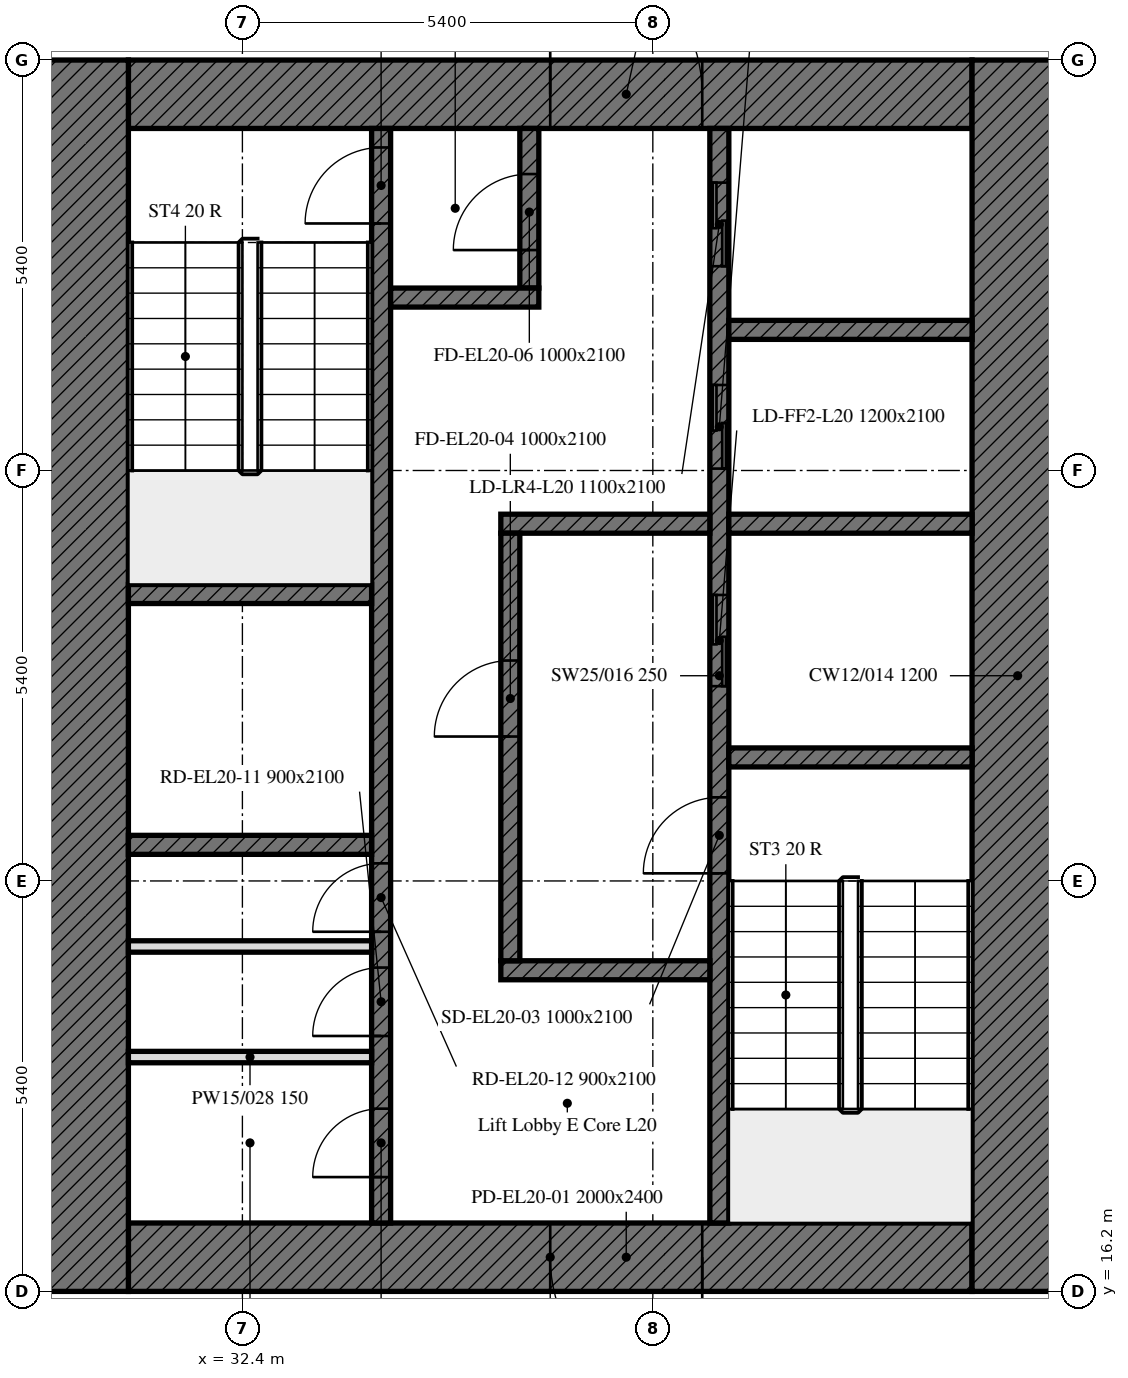
"""IFC4 building model, lengths in metres.
Left out: names, types, materials, properties, quantities, classifications, styles, units other than length and angle.
Written with IfcOpenShell. Run it as: python <this file> out.ifc"""

import sys

from ifc_helpers import new_model, si_unit, direction, frame, frame_2d, origin, place, context, subcontext, project, spatial, rectangle, extrude, element, fill, save


model = new_model("IFC4")
c1 = context("Model", 3, precision=1e-05, world=origin(), true_north=direction((0.0, 1.0)))
c2 = subcontext(c1, "Body", "Model", "MODEL_VIEW")
j1 = project(units=[si_unit("LENGTHUNIT", "METRE"), si_unit("PLANEANGLEUNIT", "RADIAN")], contexts=[c1])
p1 = place(None, origin())
s1 = spatial("IfcSite", under=j1, at=p1, CompositionType="ELEMENT")
p2 = place(p1, origin())
s2 = spatial("IfcBuilding", under=s1, at=p2, CompositionType="ELEMENT")
p3 = place(p2, frame((0.0, 0.0, 87.8)))
s3 = spatial("IfcBuildingStorey", under=s2, at=p3, CompositionType="ELEMENT", Elevation=87.8)
p4 = place(p3, frame((42.0, 16.65, 0.0), z_axis=(0.0, 0.0, 1.0), x_axis=(-1.0, 0.0, 0.0)))
e1 = element("IfcWall", 1, at=p4, inside=s3, PredefinedType="SOLIDWALL", context=c2, shape_type="SweptSolid", body=[
    extrude(rectangle(XDim=11.1, YDim=0.9, at=frame_2d((5.55, 0.0))), origin(), (0.0, 0.0, 1.0), 3.5),
])
p5 = place(p4, frame((3.55, 0.0, 0.0)))
e2 = element("IfcOpeningElement", 2, at=p5, cuts=e1, PredefinedType="OPENING", context=c2, shape_type="SweptSolid", body=[
    extrude(rectangle(XDim=2.0, YDim=2.4, at=frame_2d((1.0, 1.2))), frame((0.0, 0.45, 0.0), z_axis=(0.0, -1.0, 0.0), x_axis=(1.0, 0.0, 0.0)), (0.0, 0.0, 1.0), 0.9),
])
p6 = place(p3, frame((30.9, 31.95, 0.0), z_axis=(0.0, 0.0, 1.0), x_axis=(1.0, 0.0, 0.0)))
e3 = element("IfcWall", 3, at=p6, inside=s3, PredefinedType="SOLIDWALL", context=c2, shape_type="SweptSolid", body=[
    extrude(rectangle(XDim=11.1, YDim=0.9, at=frame_2d((5.55, 0.0))), origin(), (0.0, 0.0, 1.0), 3.5),
])
p7 = place(p6, frame((5.55, 0.0, 0.0)))
e4 = element("IfcOpeningElement", 4, at=p7, cuts=e3, PredefinedType="OPENING", context=c2, shape_type="SweptSolid", body=[
    extrude(rectangle(XDim=2.0, YDim=2.4, at=frame_2d((1.0, 1.2))), frame((0.0, 0.45, 0.0), z_axis=(0.0, -1.0, 0.0), x_axis=(1.0, 0.0, 0.0)), (0.0, 0.0, 1.0), 0.9),
])
for number, where, z_axis, x_axis in (
    (5, (42.6, 32.4, 0.0), (0.0, 0.0, 1.0), (0.0, -1.0, 0.0)),
    (6, (30.3, 16.2, 0.0), (0.0, 0.0, 1.0), (0.0, 1.0, 0.0)),
):
    element("IfcWall", number, at=place(p3, frame(where, z_axis=z_axis, x_axis=x_axis)), inside=s3, PredefinedType="SOLIDWALL", context=c2, shape_type="SweptSolid", body=[
        extrude(rectangle(XDim=16.2, YDim=1.2, at=frame_2d((8.1, 0.0))), origin(), (0.0, 0.0, 1.0), 3.5),
    ])
p8 = place(p3, frame((38.675, 17.1, 0.0), z_axis=(0.0, 0.0, 1.0), x_axis=(0.0, 1.0, 0.0)))
e7 = element("IfcWall", 7, at=p8, inside=s3, PredefinedType="SOLIDWALL", context=c2, shape_type="SweptSolid", body=[
    extrude(rectangle(XDim=14.4, YDim=0.25, at=frame_2d((7.2, 0.0))), origin(), (0.0, 0.0, 1.0), 3.5),
])
p9 = place(p8, frame((4.6, 0.0, 0.0)))
e8 = element("IfcOpeningElement", 8, at=p9, cuts=e7, PredefinedType="OPENING", context=c2, shape_type="SweptSolid", body=[
    extrude(rectangle(XDim=1.0, YDim=2.1, at=frame_2d((0.5, 1.05))), frame((0.0, 0.125, 0.0), z_axis=(0.0, -1.0, 0.0), x_axis=(1.0, 0.0, 0.0)), (0.0, 0.0, 1.0), 0.25),
])
p10 = place(p8, frame((7.062, 0.0, 0.0)))
e9 = element("IfcOpeningElement", 9, at=p10, cuts=e7, PredefinedType="OPENING", context=c2, shape_type="SweptSolid", body=[
    extrude(rectangle(XDim=1.2, YDim=2.1, at=frame_2d((0.6, 1.05))), frame((0.0, 0.125, 0.0), z_axis=(0.0, -1.0, 0.0), x_axis=(1.0, 0.0, 0.0)), (0.0, 0.0, 1.0), 0.25),
])
p11 = place(p8, frame((9.925, 0.0, 0.0)))
e10 = element("IfcOpeningElement", 10, at=p11, cuts=e7, PredefinedType="OPENING", context=c2, shape_type="SweptSolid", body=[
    extrude(rectangle(XDim=1.1, YDim=2.1, at=frame_2d((0.55, 1.05))), frame((0.0, 0.125, 0.0), z_axis=(0.0, -1.0, 0.0), x_axis=(1.0, 0.0, 0.0)), (0.0, 0.0, 1.0), 0.25),
])
p12 = place(p8, frame((12.587, 0.0, 0.0)))
e11 = element("IfcOpeningElement", 11, at=p12, cuts=e7, PredefinedType="OPENING", context=c2, shape_type="SweptSolid", body=[
    extrude(rectangle(XDim=1.1, YDim=2.1, at=frame_2d((0.55, 1.05))), frame((0.0, 0.125, 0.0), z_axis=(0.0, -1.0, 0.0), x_axis=(1.0, 0.0, 0.0)), (0.0, 0.0, 1.0), 0.25),
])
p13 = place(p3, frame((34.225, 17.1, 0.0), z_axis=(0.0, 0.0, 1.0), x_axis=(0.0, 1.0, 0.0)))
e12 = element("IfcWall", 12, at=p13, inside=s3, PredefinedType="SOLIDWALL", context=c2, shape_type="SweptSolid", body=[
    extrude(rectangle(XDim=14.4, YDim=0.25, at=frame_2d((7.2, 0.0))), origin(), (0.0, 0.0, 1.0), 3.5),
])
p14 = place(p13, frame((13.15, 0.0, 0.0)))
e13 = element("IfcOpeningElement", 13, at=p14, cuts=e12, PredefinedType="OPENING", context=c2, shape_type="SweptSolid", body=[
    extrude(rectangle(XDim=1.0, YDim=2.1, at=frame_2d((0.5, 1.05))), frame((0.0, 0.125, 0.0), z_axis=(0.0, -1.0, 0.0), x_axis=(1.0, 0.0, 0.0)), (0.0, 0.0, 1.0), 0.25),
])
p15 = place(p13, frame((0.604, 0.0, 0.0)))
e14 = element("IfcOpeningElement", 14, at=p15, cuts=e12, PredefinedType="OPENING", context=c2, shape_type="SweptSolid", body=[
    extrude(rectangle(XDim=0.9, YDim=2.1, at=frame_2d((0.45, 1.05))), frame((0.0, 0.125, 0.0), z_axis=(0.0, -1.0, 0.0), x_axis=(1.0, 0.0, 0.0)), (0.0, 0.0, 1.0), 0.25),
])
p16 = place(p13, frame((2.46, 0.0, 0.0)))
e15 = element("IfcOpeningElement", 15, at=p16, cuts=e12, PredefinedType="OPENING", context=c2, shape_type="SweptSolid", body=[
    extrude(rectangle(XDim=0.9, YDim=2.1, at=frame_2d((0.45, 1.05))), frame((0.0, 0.125, 0.0), z_axis=(0.0, -1.0, 0.0), x_axis=(1.0, 0.0, 0.0)), (0.0, 0.0, 1.0), 0.25),
])
p17 = place(p13, frame((3.832, 0.0, 0.0)))
e16 = element("IfcOpeningElement", 16, at=p17, cuts=e12, PredefinedType="OPENING", context=c2, shape_type="SweptSolid", body=[
    extrude(rectangle(XDim=0.9, YDim=2.1, at=frame_2d((0.45, 1.05))), frame((0.0, 0.125, 0.0), z_axis=(0.0, -1.0, 0.0), x_axis=(1.0, 0.0, 0.0)), (0.0, 0.0, 1.0), 0.25),
])
p18 = place(p3, frame((38.8, 23.225, 0.0), z_axis=(0.0, 0.0, 1.0), x_axis=(1.0, 0.0, 0.0)))
e17 = element("IfcWall", 17, at=p18, inside=s3, PredefinedType="SOLIDWALL", context=c2, shape_type="SweptSolid", body=[
    extrude(rectangle(XDim=3.2, YDim=0.25, at=frame_2d((1.6, 0.0))), origin(), (0.0, 0.0, 1.0), 3.5),
])
for number, where, z_axis, x_axis in (
    (18, (30.9, 25.375, 0.0), (0.0, 0.0, 1.0), (1.0, 0.0, 0.0)),
    (19, (30.9, 22.075, 0.0), (0.0, 0.0, 1.0), (1.0, 0.0, 0.0)),
):
    element("IfcWall", number, at=place(p3, frame(where, z_axis=z_axis, x_axis=x_axis)), inside=s3, PredefinedType="SOLIDWALL", context=c2, shape_type="SweptSolid", body=[
        extrude(rectangle(XDim=3.2, YDim=0.25, at=frame_2d((1.6, 0.0))), origin(), (0.0, 0.0, 1.0), 3.5),
    ])
p19 = place(p3, frame((38.8, 26.3, 0.0), z_axis=(0.0, 0.0, 1.0), x_axis=(1.0, 0.0, 0.0)))
e20 = element("IfcWall", 20, at=p19, inside=s3, PredefinedType="SOLIDWALL", context=c2, shape_type="SweptSolid", body=[
    extrude(rectangle(XDim=3.2, YDim=0.25, at=frame_2d((1.6, 0.0))), origin(), (0.0, 0.0, 1.0), 3.5),
])
for number, where, z_axis, x_axis in (
    (21, (35.8, 26.3, 0.0), (0.0, 0.0, 1.0), (1.0, 0.0, 0.0)),
    (22, (35.8, 20.425, 0.0), (0.0, 0.0, 1.0), (1.0, 0.0, 0.0)),
):
    element("IfcWall", number, at=place(p3, frame(where, z_axis=z_axis, x_axis=x_axis)), inside=s3, PredefinedType="SOLIDWALL", context=c2, shape_type="SweptSolid", body=[
        extrude(rectangle(XDim=2.75, YDim=0.25, at=frame_2d((1.375, 0.0))), origin(), (0.0, 0.0, 1.0), 3.5),
    ])
p20 = place(p3, frame((36.175, 29.4, 0.0), z_axis=(0.0, 0.0, 1.0), x_axis=(0.0, 1.0, 0.0)))
e23 = element("IfcWall", 23, at=p20, inside=s3, PredefinedType="SOLIDWALL", context=c2, shape_type="SweptSolid", body=[
    extrude(rectangle(XDim=2.1, YDim=0.25, at=frame_2d((1.05, 0.0))), origin(), (0.0, 0.0, 1.0), 3.5),
])
p21 = place(p20, frame((0.5, 0.0, 0.0)))
e24 = element("IfcOpeningElement", 24, at=p21, cuts=e23, PredefinedType="OPENING", context=c2, shape_type="SweptSolid", body=[
    extrude(rectangle(XDim=1.0, YDim=2.1, at=frame_2d((0.5, 1.05))), frame((0.0, 0.125, 0.0), z_axis=(0.0, -1.0, 0.0), x_axis=(1.0, 0.0, 0.0)), (0.0, 0.0, 1.0), 0.25),
])
p22 = place(p3, frame((34.35, 29.275, 0.0), z_axis=(0.0, 0.0, 1.0), x_axis=(1.0, 0.0, 0.0)))
e25 = element("IfcWall", 25, at=p22, inside=s3, PredefinedType="SOLIDWALL", context=c2, shape_type="SweptSolid", body=[
    extrude(rectangle(XDim=1.95, YDim=0.25, at=frame_2d((0.975, 0.0))), origin(), (0.0, 0.0, 1.0), 3.5),
])
p23 = place(p3, frame((35.925, 20.55, 0.0), z_axis=(0.0, 0.0, 1.0), x_axis=(0.0, 1.0, 0.0)))
e26 = element("IfcWall", 26, at=p23, inside=s3, PredefinedType="SOLIDWALL", context=c2, shape_type="SweptSolid", body=[
    extrude(rectangle(XDim=5.625, YDim=0.25, at=frame_2d((2.812, 0.0))), origin(), (0.0, 0.0, 1.0), 3.5),
])
p24 = place(p23, frame((2.95, 0.0, 0.0)))
e27 = element("IfcOpeningElement", 27, at=p24, cuts=e26, PredefinedType="OPENING", context=c2, shape_type="SweptSolid", body=[
    extrude(rectangle(XDim=1.0, YDim=2.1, at=frame_2d((0.5, 1.05))), frame((0.0, 0.125, 0.0), z_axis=(0.0, -1.0, 0.0), x_axis=(1.0, 0.0, 0.0)), (0.0, 0.0, 1.0), 0.25),
])
p25 = place(p3, frame((38.8, 28.85, 0.0), z_axis=(0.0, 0.0, 1.0), x_axis=(1.0, 0.0, 0.0)))
e28 = element("IfcWall", 28, at=p25, inside=s3, PredefinedType="SOLIDWALL", context=c2, shape_type="SweptSolid", body=[
    extrude(rectangle(XDim=3.2, YDim=0.25, at=frame_2d((1.6, 0.0))), origin(), (0.0, 0.0, 1.0), 3.5),
])
for number, where, z_axis, x_axis in (
    (29, (30.9, 19.283, 0.0), (0.0, 0.0, 1.0), (1.0, 0.0, 0.0)),
    (30, (30.9, 20.738, 0.0), (0.0, 0.0, 1.0), (1.0, 0.0, 0.0)),
):
    element("IfcWall", number, at=place(p3, frame(where, z_axis=z_axis, x_axis=x_axis)), inside=s3, PredefinedType="PARTITIONING", context=c2, shape_type="SweptSolid", body=[
        extrude(rectangle(XDim=3.2, YDim=0.15, at=frame_2d((1.6, 0.0))), origin(), (0.0, 0.0, 1.0), 3.5),
    ])
p26 = place(p5, origin())
e31 = element("IfcDoor", 31, at=p26, inside=s3, OperationType="DOUBLE_DOOR_SINGLE_SWING", PredefinedType="DOOR", context=c2, shape_type="SweptSolid", body=[
    extrude(rectangle(XDim=2.0, YDim=2.4, at=frame_2d((1.0, 1.2))), frame((0.0, 0.025, 0.0), z_axis=(0.0, -1.0, 0.0), x_axis=(1.0, 0.0, 0.0)), (0.0, 0.0, 1.0), 0.05),
])
fill(e2, e31)
p27 = place(p7, origin())
e32 = element("IfcDoor", 32, at=p27, inside=s3, OperationType="DOUBLE_DOOR_SINGLE_SWING", PredefinedType="DOOR", context=c2, shape_type="SweptSolid", body=[
    extrude(rectangle(XDim=2.0, YDim=2.4, at=frame_2d((1.0, 1.2))), frame((0.0, 0.025, 0.0), z_axis=(0.0, -1.0, 0.0), x_axis=(1.0, 0.0, 0.0)), (0.0, 0.0, 1.0), 0.05),
])
fill(e4, e32)
p28 = place(p9, origin())
e33 = element("IfcDoor", 33, at=p28, inside=s3, OperationType="SINGLE_SWING_LEFT", PredefinedType="DOOR", context=c2, shape_type="SweptSolid", body=[
    extrude(rectangle(XDim=1.0, YDim=2.1, at=frame_2d((0.5, 1.05))), frame((0.0, 0.025, 0.0), z_axis=(0.0, -1.0, 0.0), x_axis=(1.0, 0.0, 0.0)), (0.0, 0.0, 1.0), 0.05),
])
fill(e8, e33)
p29 = place(p24, origin())
e34 = element("IfcDoor", 34, at=p29, inside=s3, OperationType="SINGLE_SWING_LEFT", PredefinedType="DOOR", context=c2, shape_type="SweptSolid", body=[
    extrude(rectangle(XDim=1.0, YDim=2.1, at=frame_2d((0.5, 1.05))), frame((0.0, 0.025, 0.0), z_axis=(0.0, -1.0, 0.0), x_axis=(1.0, 0.0, 0.0)), (0.0, 0.0, 1.0), 0.05),
])
fill(e27, e34)
p30 = place(p14, origin())
e35 = element("IfcDoor", 35, at=p30, inside=s3, OperationType="SINGLE_SWING_LEFT", PredefinedType="DOOR", context=c2, shape_type="SweptSolid", body=[
    extrude(rectangle(XDim=1.0, YDim=2.1, at=frame_2d((0.5, 1.05))), frame((0.0, 0.025, 0.0), z_axis=(0.0, -1.0, 0.0), x_axis=(1.0, 0.0, 0.0)), (0.0, 0.0, 1.0), 0.05),
])
fill(e13, e35)
p31 = place(p21, origin())
e36 = element("IfcDoor", 36, at=p31, inside=s3, OperationType="SINGLE_SWING_LEFT", PredefinedType="DOOR", context=c2, shape_type="SweptSolid", body=[
    extrude(rectangle(XDim=1.0, YDim=2.1, at=frame_2d((0.5, 1.05))), frame((0.0, 0.025, 0.0), z_axis=(0.0, -1.0, 0.0), x_axis=(1.0, 0.0, 0.0)), (0.0, 0.0, 1.0), 0.05),
])
fill(e24, e36)
p32 = place(p10, origin())
e37 = element("IfcDoor", 37, at=p32, inside=s3, OperationType="DOUBLE_DOOR_SLIDING", PredefinedType="DOOR", context=c2, shape_type="SweptSolid", body=[
    extrude(rectangle(XDim=1.2, YDim=2.1, at=frame_2d((0.6, 1.05))), frame((0.0, 0.025, 0.0), z_axis=(0.0, -1.0, 0.0), x_axis=(1.0, 0.0, 0.0)), (0.0, 0.0, 1.0), 0.05),
])
fill(e9, e37)
p33 = place(p11, origin())
e38 = element("IfcDoor", 38, at=p33, inside=s3, OperationType="DOUBLE_DOOR_SLIDING", PredefinedType="DOOR", context=c2, shape_type="SweptSolid", body=[
    extrude(rectangle(XDim=1.1, YDim=2.1, at=frame_2d((0.55, 1.05))), frame((0.0, 0.025, 0.0), z_axis=(0.0, -1.0, 0.0), x_axis=(1.0, 0.0, 0.0)), (0.0, 0.0, 1.0), 0.05),
])
fill(e10, e38)
p34 = place(p12, origin())
e39 = element("IfcDoor", 39, at=p34, inside=s3, OperationType="DOUBLE_DOOR_SLIDING", PredefinedType="DOOR", context=c2, shape_type="SweptSolid", body=[
    extrude(rectangle(XDim=1.1, YDim=2.1, at=frame_2d((0.55, 1.05))), frame((0.0, 0.025, 0.0), z_axis=(0.0, -1.0, 0.0), x_axis=(1.0, 0.0, 0.0)), (0.0, 0.0, 1.0), 0.05),
])
fill(e11, e39)
p35 = place(p15, origin())
e40 = element("IfcDoor", 40, at=p35, inside=s3, OperationType="SINGLE_SWING_LEFT", PredefinedType="DOOR", context=c2, shape_type="SweptSolid", body=[
    extrude(rectangle(XDim=0.9, YDim=2.1, at=frame_2d((0.45, 1.05))), frame((0.0, 0.025, 0.0), z_axis=(0.0, -1.0, 0.0), x_axis=(1.0, 0.0, 0.0)), (0.0, 0.0, 1.0), 0.05),
])
fill(e14, e40)
p36 = place(p16, origin())
e41 = element("IfcDoor", 41, at=p36, inside=s3, OperationType="SINGLE_SWING_LEFT", PredefinedType="DOOR", context=c2, shape_type="SweptSolid", body=[
    extrude(rectangle(XDim=0.9, YDim=2.1, at=frame_2d((0.45, 1.05))), frame((0.0, 0.025, 0.0), z_axis=(0.0, -1.0, 0.0), x_axis=(1.0, 0.0, 0.0)), (0.0, 0.0, 1.0), 0.05),
])
fill(e15, e41)
p37 = place(p17, origin())
e42 = element("IfcDoor", 42, at=p37, inside=s3, OperationType="SINGLE_SWING_LEFT", PredefinedType="DOOR", context=c2, shape_type="SweptSolid", body=[
    extrude(rectangle(XDim=0.9, YDim=2.1, at=frame_2d((0.45, 1.05))), frame((0.0, 0.025, 0.0), z_axis=(0.0, -1.0, 0.0), x_axis=(1.0, 0.0, 0.0)), (0.0, 0.0, 1.0), 0.05),
])
fill(e16, e42)
save(model, sys.argv[1])
